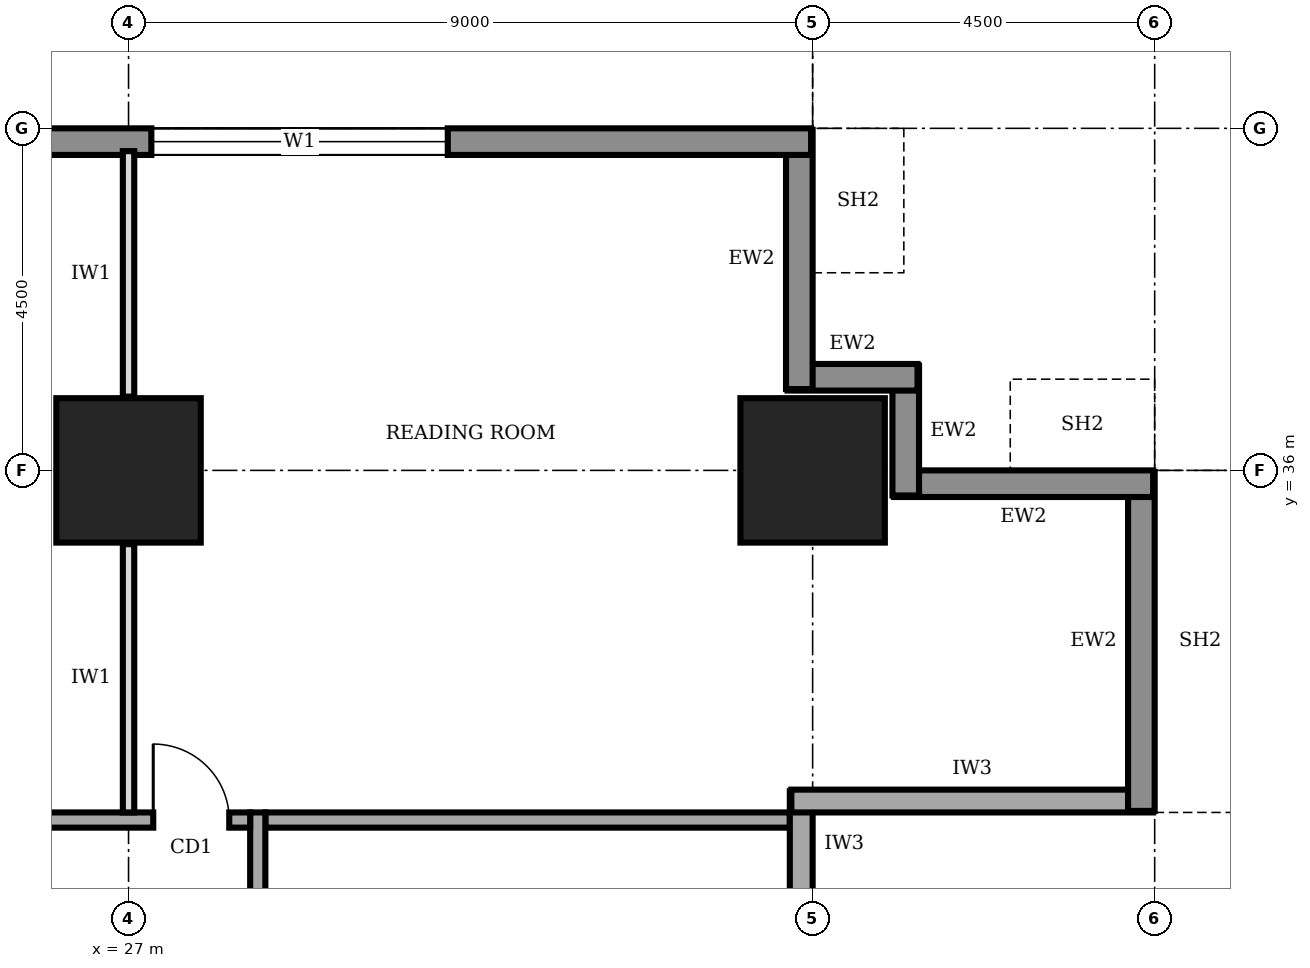
"""IFC4 building model, lengths in metres.
Left out: names, types, materials, properties, quantities, classifications, styles, units other than length and angle.
Written with IfcOpenShell. Run it as: python <this file> out.ifc"""

import sys

from ifc_helpers import new_model, si_unit, direction, frame, frame_2d, origin, origin_2d, place, context, subcontext, project, spatial, rectangle, extrude, element, fill, save


model = new_model("IFC4")
c1 = context("Model", 3, precision=1e-05, world=origin(), true_north=direction((0.0, 1.0)))
c2 = subcontext(c1, "Body", "Model", "MODEL_VIEW")
j1 = project(units=[si_unit("LENGTHUNIT", "METRE"), si_unit("PLANEANGLEUNIT", "RADIAN")], contexts=[c1])
p1 = place(None, origin())
s1 = spatial("IfcSite", under=j1, at=p1, CompositionType="ELEMENT")
p2 = place(p1, origin())
s2 = spatial("IfcBuilding", under=s1, at=p2, CompositionType="ELEMENT")
p3 = place(p2, frame((0.0, 0.0, 133.0)))
s3 = spatial("IfcBuildingStorey", under=s2, at=p3, CompositionType="ELEMENT", Elevation=133.0)
for number, where, z_axis, x_axis in (
    (1, (27.0, 36.0, 0.0), (0.0, 0.0, 1.0), (1.0, 0.0, 0.0)),
    (2, (36.0, 36.0, 0.0), (0.0, 0.0, 1.0), (1.0, 0.0, 0.0)),
):
    element("IfcColumn", number, at=place(p3, frame(where, z_axis=z_axis, x_axis=x_axis)), inside=s3, PredefinedType="COLUMN", context=c2, shape_type="SweptSolid", body=[
        extrude(rectangle(XDim=1.9, YDim=1.9, at=origin_2d()), origin(), (0.0, 0.0, 1.0), 4.0),
    ])
p4 = place(p3, frame((35.85, 30.4, 0.0), z_axis=(0.0, 0.0, 1.0), x_axis=(0.0, 1.0, 0.0)))
e3 = element("IfcWall", 3, at=p4, inside=s3, PredefinedType="SOLIDWALL", context=c2, shape_type="SweptSolid", body=[
    extrude(rectangle(XDim=1.38, YDim=0.3, at=frame_2d((0.69, 0.0))), origin(), (0.0, 0.0, 1.0), 2.65),
])
p5 = place(p3, frame((35.72, 31.65, 0.0), z_axis=(0.0, 0.0, 1.0), x_axis=(1.0, 0.0, 0.0)))
e4 = element("IfcWall", 4, at=p5, inside=s3, PredefinedType="SOLIDWALL", context=c2, shape_type="SweptSolid", body=[
    extrude(rectangle(XDim=4.76, YDim=0.3, at=frame_2d((2.38, 0.0))), origin(), (0.0, 0.0, 1.0), 3.75),
])
p6 = place(p3, frame((40.325, 31.52, 0.0), z_axis=(0.0, 0.0, 1.0), x_axis=(0.0, 1.0, 0.0)))
e5 = element("IfcWall", 5, at=p6, inside=s3, PredefinedType="STANDARD", context=c2, shape_type="SweptSolid", body=[
    extrude(rectangle(XDim=4.46, YDim=0.35, at=frame_2d((2.23, 0.0))), origin(), (0.0, 0.0, 1.0), 3.75),
])
p7 = place(p3, frame((40.48, 35.825, 0.0), z_axis=(0.0, 0.0, 1.0), x_axis=(-1.0, 0.0, 0.0)))
e6 = element("IfcWall", 6, at=p7, inside=s3, PredefinedType="STANDARD", context=c2, shape_type="SweptSolid", body=[
    extrude(rectangle(XDim=3.41, YDim=0.35, at=frame_2d((1.705, 0.0))), origin(), (0.0, 0.0, 1.0), 2.85),
])
for number, where, z_axis, x_axis in (
    (7, (37.225, 35.67, 0.0), (0.0, 0.0, 1.0), (0.0, 1.0, 0.0)),
    (8, (37.38, 37.225, 0.0), (0.0, 0.0, 1.0), (-1.0, 0.0, 0.0)),
):
    element("IfcWall", number, at=place(p3, frame(where, z_axis=z_axis, x_axis=x_axis)), inside=s3, PredefinedType="STANDARD", context=c2, shape_type="SweptSolid", body=[
        extrude(rectangle(XDim=1.71, YDim=0.35, at=frame_2d((0.855, 0.0))), origin(), (0.0, 0.0, 1.0), 3.75),
    ])
p8 = place(p3, frame((35.825, 37.07, 0.0), z_axis=(0.0, 0.0, 1.0), x_axis=(0.0, 1.0, 0.0)))
e9 = element("IfcWall", 9, at=p8, inside=s3, PredefinedType="STANDARD", context=c2, shape_type="SweptSolid", body=[
    extrude(rectangle(XDim=3.41, YDim=0.35, at=frame_2d((1.705, 0.0))), origin(), (0.0, 0.0, 1.0), 2.85),
])
p9 = place(p3, frame((35.98, 40.325, 0.0), z_axis=(0.0, 0.0, 1.0), x_axis=(-1.0, 0.0, 0.0)))
e10 = element("IfcWall", 10, at=p9, inside=s3, PredefinedType="STANDARD", context=c2, shape_type="SweptSolid", body=[
    extrude(rectangle(XDim=31.46, YDim=0.35, at=frame_2d((15.73, 0.0))), origin(), (0.0, 0.0, 1.0), 3.75),
])
p10 = place(p9, frame((27.21, 0.0, 0.9)))
e11 = element("IfcOpeningElement", 11, at=p10, cuts=e10, PredefinedType="OPENING", context=c2, shape_type="SweptSolid", body=[
    extrude(rectangle(XDim=3.9, YDim=2.2, at=frame_2d((1.95, 1.1))), frame((0.0, 0.185, 0.0), z_axis=(0.0, -1.0, 0.0), x_axis=(1.0, 0.0, 0.0)), (0.0, 0.0, 1.0), 0.37),
])
p11 = place(p9, frame((22.78, 0.0, 0.9)))
e12 = element("IfcOpeningElement", 12, at=p11, cuts=e10, PredefinedType="OPENING", context=c2, shape_type="SweptSolid", body=[
    extrude(rectangle(XDim=3.9, YDim=2.2, at=frame_2d((1.95, 1.1))), frame((0.0, 0.185, 0.0), z_axis=(0.0, -1.0, 0.0), x_axis=(1.0, 0.0, 0.0)), (0.0, 0.0, 1.0), 0.37),
])
p12 = place(p9, frame((4.78, 0.0, 0.9)))
e13 = element("IfcOpeningElement", 13, at=p12, cuts=e10, PredefinedType="OPENING", context=c2, shape_type="SweptSolid", body=[
    extrude(rectangle(XDim=3.9, YDim=2.2, at=frame_2d((1.95, 1.1))), frame((0.0, 0.185, 0.0), z_axis=(0.0, -1.0, 0.0), x_axis=(1.0, 0.0, 0.0)), (0.0, 0.0, 1.0), 0.37),
])
p13 = place(p3, frame((28.7, 7.7, 0.0), z_axis=(0.0, 0.0, 1.0), x_axis=(0.0, 1.0, 0.0)))
e14 = element("IfcWall", 14, at=p13, inside=s3, PredefinedType="SOLIDWALL", context=c2, shape_type="SweptSolid", body=[
    extrude(rectangle(XDim=23.8, YDim=0.2, at=frame_2d((11.9, 0.0))), origin(), (0.0, 0.0, 1.0), 3.75),
])
p14 = place(p13, frame((10.9, 0.0, 0.0)))
e15 = element("IfcOpeningElement", 15, at=p14, cuts=e14, PredefinedType="OPENING", context=c2, shape_type="SweptSolid", body=[
    extrude(rectangle(XDim=1.8, YDim=2.1, at=frame_2d((0.9, 1.05))), frame((0.0, 0.11, 0.0), z_axis=(0.0, -1.0, 0.0), x_axis=(1.0, 0.0, 0.0)), (0.0, 0.0, 1.0), 0.22),
])
p15 = place(p3, frame((28.6, 31.4, 0.0), z_axis=(0.0, 0.0, 1.0), x_axis=(-1.0, 0.0, 0.0)))
e16 = element("IfcWall", 16, at=p15, inside=s3, PredefinedType="SOLIDWALL", context=c2, shape_type="SweptSolid", body=[
    extrude(rectangle(XDim=16.9, YDim=0.2, at=frame_2d((8.45, 0.0))), origin(), (0.0, 0.0, 1.0), 3.75),
])
p16 = place(p15, frame((15.425, 0.0, 0.0)))
e17 = element("IfcOpeningElement", 17, at=p16, cuts=e16, PredefinedType="OPENING", context=c2, shape_type="SweptSolid", body=[
    extrude(rectangle(XDim=1.0, YDim=2.1, at=frame_2d((0.5, 1.05))), frame((0.0, 0.11, 0.0), z_axis=(0.0, -1.0, 0.0), x_axis=(1.0, 0.0, 0.0)), (0.0, 0.0, 1.0), 0.22),
])
p17 = place(p15, frame((12.35, 0.0, 0.0)))
e18 = element("IfcOpeningElement", 18, at=p17, cuts=e16, PredefinedType="OPENING", context=c2, shape_type="SweptSolid", body=[
    extrude(rectangle(XDim=1.0, YDim=2.1, at=frame_2d((0.5, 1.05))), frame((0.0, 0.11, 0.0), z_axis=(0.0, -1.0, 0.0), x_axis=(1.0, 0.0, 0.0)), (0.0, 0.0, 1.0), 0.22),
])
p18 = place(p15, frame((5.6, 0.0, 0.0)))
e19 = element("IfcOpeningElement", 19, at=p18, cuts=e16, PredefinedType="OPENING", context=c2, shape_type="SweptSolid", body=[
    extrude(rectangle(XDim=1.0, YDim=2.1, at=frame_2d((0.5, 1.05))), frame((0.0, 0.11, 0.0), z_axis=(0.0, -1.0, 0.0), x_axis=(1.0, 0.0, 0.0)), (0.0, 0.0, 1.0), 0.22),
])
p19 = place(p15, frame((0.275, 0.0, 0.0)))
e20 = element("IfcOpeningElement", 20, at=p19, cuts=e16, PredefinedType="OPENING", context=c2, shape_type="SweptSolid", body=[
    extrude(rectangle(XDim=1.0, YDim=2.1, at=frame_2d((0.5, 1.05))), frame((0.0, 0.11, 0.0), z_axis=(0.0, -1.0, 0.0), x_axis=(1.0, 0.0, 0.0)), (0.0, 0.0, 1.0), 0.22),
])
p20 = place(p3, frame((28.8, 31.4, 0.0), z_axis=(0.0, 0.0, 1.0), x_axis=(1.0, 0.0, 0.0)))
e21 = element("IfcWall", 21, at=p20, inside=s3, PredefinedType="SOLIDWALL", context=c2, shape_type="SweptSolid", body=[
    extrude(rectangle(XDim=6.9, YDim=0.2, at=frame_2d((3.45, 0.0))), origin(), (0.0, 0.0, 1.0), 3.75),
])
p21 = place(p3, frame((27.0, 31.5, 0.0), z_axis=(0.0, 0.0, 1.0), x_axis=(0.0, 1.0, 0.0)))
e22 = element("IfcWall", 22, at=p21, inside=s3, PredefinedType="PARTITIONING", context=c2, shape_type="SweptSolid", body=[
    extrude(rectangle(XDim=3.53, YDim=0.15, at=frame_2d((1.765, 0.0))), origin(), (0.0, 0.0, 1.0), 2.85),
])
p22 = place(p3, frame((27.0, 36.97, 0.0), z_axis=(0.0, 0.0, 1.0), x_axis=(0.0, 1.0, 0.0)))
e23 = element("IfcWall", 23, at=p22, inside=s3, PredefinedType="PARTITIONING", context=c2, shape_type="SweptSolid", body=[
    extrude(rectangle(XDim=3.23, YDim=0.15, at=frame_2d((1.615, 0.0))), origin(), (0.0, 0.0, 1.0), 2.85),
])
p23 = place(p12, origin())
e24 = element("IfcWindow", 24, at=p23, inside=s3, PartitioningType="SINGLE_PANEL", PredefinedType="WINDOW", context=c2, shape_type="SweptSolid", body=[
    extrude(rectangle(XDim=3.9, YDim=2.2, at=frame_2d((1.95, 1.1))), frame((0.0, 0.03, 0.0), z_axis=(0.0, -1.0, 0.0), x_axis=(1.0, 0.0, 0.0)), (0.0, 0.0, 1.0), 0.06),
])
fill(e13, e24)
p24 = place(p19, frame((1.0, 0.0, 0.0), z_axis=(0.0, 0.0, 1.0), x_axis=(-1.0, 0.0, 0.0)))
e25 = element("IfcDoor", 25, at=p24, inside=s3, OperationType="SINGLE_SWING_LEFT", PredefinedType="DOOR", context=c2, shape_type="SweptSolid", body=[
    extrude(rectangle(XDim=1.0, YDim=2.1, at=frame_2d((0.5, 1.05))), frame((0.0, 0.025, 0.0), z_axis=(0.0, -1.0, 0.0), x_axis=(1.0, 0.0, 0.0)), (0.0, 0.0, 1.0), 0.05),
])
fill(e20, e25)
save(model, sys.argv[1])
